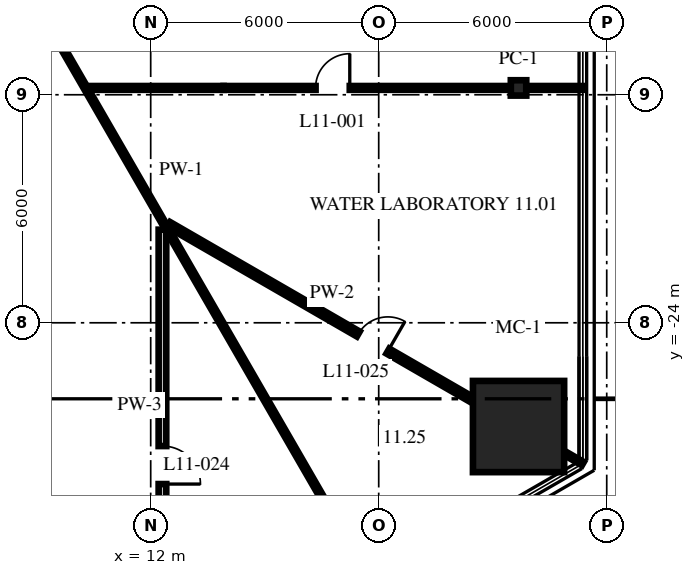
"""IFC4 building model, lengths in metres.
Left out: names, types, materials, properties, quantities, classifications, styles, units other than length and angle.
Written with IfcOpenShell. Run it as: python <this file> out.ifc"""

import sys

from ifc_helpers import new_model, si_unit, direction, frame, frame_2d, origin, origin_2d, place, context, subcontext, project, spatial, rectangle, i_section, extrude, source, transform, mapped, element, fill, save


model = new_model("IFC4")
c1 = context("Model", 3, precision=1e-05, world=origin(), true_north=direction((0.0, 1.0)))
c2 = subcontext(c1, "Body", "Model", "MODEL_VIEW")
j1 = project(units=[si_unit("LENGTHUNIT", "METRE"), si_unit("PLANEANGLEUNIT", "RADIAN")], contexts=[c1])
p1 = place(None, origin())
s1 = spatial("IfcSite", under=j1, at=p1, CompositionType="ELEMENT")
p2 = place(p1, origin())
s2 = spatial("IfcBuilding", under=s1, at=p2, CompositionType="ELEMENT")
p3 = place(p2, frame((0.0, 0.0, 50.4)))
s3 = spatial("IfcBuildingStorey", under=s2, at=p3, CompositionType="ELEMENT", Elevation=50.4)
m1 = source(origin(), c2, "Body", "SweptSolid", [
    extrude(rectangle(XDim=2.4, YDim=2.4, at=origin_2d()), origin(), (0.0, 0.0, 1.0), 3.15),
])
p4 = place(p3, frame((21.679, -26.73, 0.0), z_axis=(0.0, 0.0, 1.0), x_axis=(0.0, 1.0, 0.0)))
e1 = element("IfcColumn", 1, at=p4, inside=s3, PredefinedType="COLUMN", context=c2, shape_type="MappedRepresentation", body=[
    mapped(m1, transform((0.0, 0.0, 0.0), scale=1.0)),
])
m2 = source(origin(), c2, "Body", "SweptSolid", [
    extrude(i_section(OverallWidth=0.404, OverallDepth=0.406, WebThickness=0.027, FlangeThickness=0.044, at=origin_2d()), origin(), (0.0, 0.0, 1.0), 3.15),
])
p5 = place(p3, frame((21.679, -17.82, 0.0), z_axis=(0.0, 0.0, 1.0), x_axis=(0.0, 1.0, 0.0)))
e2 = element("IfcColumn", 2, at=p5, inside=s3, PredefinedType="COLUMN", context=c2, shape_type="MappedRepresentation", body=[
    mapped(m2, transform((0.0, 0.0, 0.0), scale=1.0)),
])
p6 = place(p3, frame((7.761, -13.442, 0.0), z_axis=(0.0, 0.0, 1.0), x_axis=(0.499995773473, -0.866027843957, 0.0)))
e3 = element("IfcWall", 3, at=p6, inside=s3, PredefinedType="PARTITIONING", context=c2, shape_type="SweptSolid", body=[
    extrude(rectangle(XDim=18.274, YDim=0.1, at=frame_2d((9.137, 0.0))), origin(), (0.0, 0.0, 1.0), 4.05),
])
p7 = place(p3, frame((12.474, -21.415, 0.0), z_axis=(0.0, 0.0, 1.0), x_axis=(0.86602701864, -0.499997202977, 0.0)))
e4 = element("IfcWall", 4, at=p7, inside=s3, PredefinedType="PARTITIONING", context=c2, shape_type="SweptSolid", body=[
    extrude(rectangle(XDim=9.256, YDim=0.15, at=frame_2d((4.628, 0.0))), origin(), (0.0, 0.0, 1.0), 4.05),
])
p8 = place(p7, frame((5.76, 0.0, 0.0)))
e5 = element("IfcOpeningElement", 5, at=p8, cuts=e4, PredefinedType="OPENING", context=c2, shape_type="SweptSolid", body=[
    extrude(rectangle(XDim=0.9, YDim=2.1, at=frame_2d((0.45, 1.05))), frame((0.0, 0.085, 0.0), z_axis=(0.0, -1.0, 0.0), x_axis=(1.0, 0.0, 0.0)), (0.0, 0.0, 1.0), 0.17),
])
p9 = place(p3, frame((22.869, -27.417, 0.0), z_axis=(0.0, 0.0, 1.0), x_axis=(0.866136511816, -0.499807505846, 0.0)))
e6 = element("IfcWall", 6, at=p9, inside=s3, PredefinedType="PARTITIONING", context=c2, shape_type="SweptSolid", body=[
    extrude(rectangle(XDim=0.58, YDim=0.1, at=frame_2d((0.29, 0.0))), origin(), (0.0, 0.0, 1.0), 4.05),
])
p10 = place(p3, frame((10.348, -17.82, 0.0), z_axis=(0.0, 0.0, 1.0), x_axis=(1.0, 0.0, 0.0)))
e7 = element("IfcWall", 7, at=p10, inside=s3, PredefinedType="PARTITIONING", context=c2, shape_type="SweptSolid", body=[
    extrude(rectangle(XDim=3.57, YDim=0.1, at=frame_2d((1.785, 0.0))), origin(), (0.0, 0.0, 1.0), 4.05),
])
m3 = source(origin(), c2, "Body", "SweptSolid", [
    extrude(rectangle(XDim=7.568, YDim=0.1, at=frame_2d((3.784, 0.0))), origin(), (0.0, 0.0, 1.0), 3.514),
])
p11 = place(p3, frame((13.918, -17.82, 0.0), z_axis=(0.0, 0.0, 1.0), x_axis=(1.0, 0.0, 0.0)))
e8 = element("IfcWall", 8, at=p11, inside=s3, PredefinedType="PARTITIONING", context=c2, shape_type="MappedRepresentation", body=[
    mapped(m3, transform((0.0, 0.0, 0.0), scale=1.0)),
])
p12 = place(p11, frame((2.42, 0.0, 0.0)))
e9 = element("IfcOpeningElement", 9, at=p12, cuts=e8, PredefinedType="OPENING", context=c2, shape_type="SweptSolid", body=[
    extrude(rectangle(XDim=0.9, YDim=2.1, at=frame_2d((0.45, 1.05))), frame((0.0, 0.06, 0.0), z_axis=(0.0, -1.0, 0.0), x_axis=(1.0, 0.0, 0.0)), (0.0, 0.0, 1.0), 0.12),
])
m4 = source(origin(), c2, "Body", "SweptSolid", [
    extrude(rectangle(XDim=1.499, YDim=0.1, at=frame_2d((0.749, 0.0))), origin(), (0.0, 0.0, 1.0), 4.05),
])
p13 = place(p3, frame((21.873, -17.82, 0.0), z_axis=(0.0, 0.0, 1.0), x_axis=(1.0, 0.0, 0.0)))
e10 = element("IfcWall", 10, at=p13, inside=s3, PredefinedType="PARTITIONING", context=c2, shape_type="MappedRepresentation", body=[
    mapped(m4, transform((0.0, 0.0, 0.0), scale=1.0)),
])
p14 = place(p3, frame((12.309, -30.766, 0.0), z_axis=(0.0, 0.0, 1.0), x_axis=(0.0, 1.0, 0.0)))
e11 = element("IfcWall", 11, at=p14, inside=s3, PredefinedType="PARTITIONING", context=c2, shape_type="SweptSolid", body=[
    extrude(rectangle(XDim=9.216, YDim=0.2, at=frame_2d((4.608, 0.0))), origin(), (0.0, 0.0, 1.0), 4.05),
])
p15 = place(p14, frame((2.522, 0.0, 0.0)))
e12 = element("IfcOpeningElement", 12, at=p15, cuts=e11, PredefinedType="OPENING", context=c2, shape_type="SweptSolid", body=[
    extrude(rectangle(XDim=1.0, YDim=2.1, at=frame_2d((0.5, 1.05))), frame((0.0, 0.11, 0.0), z_axis=(0.0, -1.0, 0.0), x_axis=(1.0, 0.0, 0.0)), (0.0, 0.0, 1.0), 0.22),
])
p16 = place(p12, origin())
e13 = element("IfcDoor", 13, at=p16, inside=s3, OperationType="SINGLE_SWING_LEFT", PredefinedType="DOOR", context=c2, shape_type="SweptSolid", body=[
    extrude(rectangle(XDim=0.9, YDim=2.1, at=frame_2d((0.45, 1.05))), frame((0.0, 0.025, 0.0), z_axis=(0.0, -1.0, 0.0), x_axis=(1.0, 0.0, 0.0)), (0.0, 0.0, 1.0), 0.05),
])
fill(e9, e13)
p17 = place(p15, origin())
e14 = element("IfcDoor", 14, at=p17, inside=s3, OperationType="SINGLE_SWING_RIGHT", PredefinedType="DOOR", context=c2, shape_type="SweptSolid", body=[
    extrude(rectangle(XDim=1.0, YDim=2.1, at=frame_2d((0.5, 1.05))), frame((0.0, 0.025, 0.0), z_axis=(0.0, -1.0, 0.0), x_axis=(1.0, 0.0, 0.0)), (0.0, 0.0, 1.0), 0.05),
])
fill(e12, e14)
p18 = place(p8, origin())
e15 = element("IfcDoor", 15, at=p18, inside=s3, OperationType="SINGLE_SWING_LEFT", PredefinedType="DOOR", context=c2, shape_type="SweptSolid", body=[
    extrude(rectangle(XDim=0.9, YDim=2.1, at=frame_2d((0.45, 1.05))), frame((0.0, 0.025, 0.0), z_axis=(0.0, -1.0, 0.0), x_axis=(1.0, 0.0, 0.0)), (0.0, 0.0, 1.0), 0.05),
])
fill(e5, e15)
save(model, sys.argv[1])
